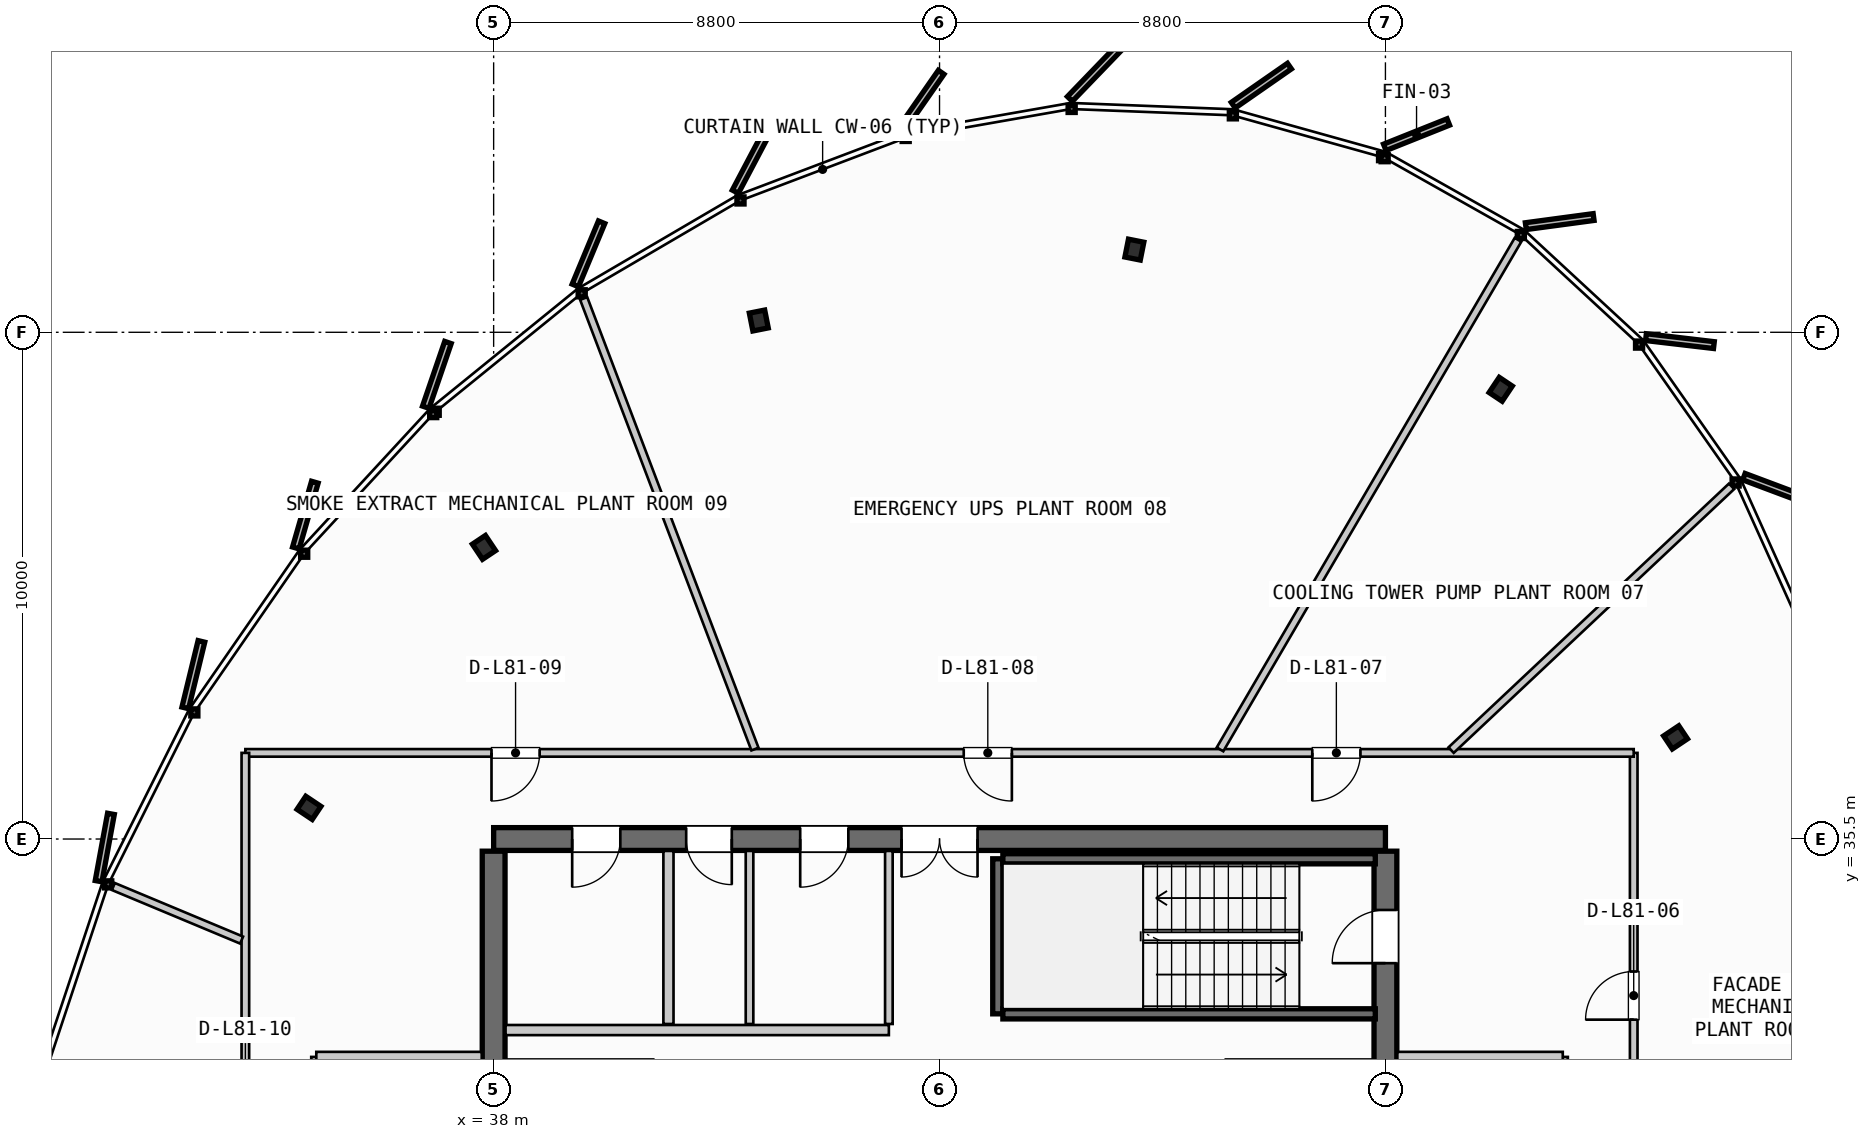
"""IFC4 building model, lengths in metres.
Left out: names, types, materials, properties, quantities, classifications, styles, units other than length and angle.
Written with IfcOpenShell. Run it as: python <this file> out.ifc"""

import sys

from ifc_helpers import new_model, si_unit, direction, frame, frame_2d, origin, origin_2d, place, context, subcontext, project, spatial, rectangle, i_section, extrude, source, transform, mapped, element, fill, save


model = new_model("IFC4")
c1 = context("Model", 3, precision=1e-05, world=origin(), true_north=direction((0.0, 1.0)))
c2 = subcontext(c1, "Body", "Model", "MODEL_VIEW")
j1 = project(units=[si_unit("LENGTHUNIT", "METRE"), si_unit("PLANEANGLEUNIT", "RADIAN")], contexts=[c1])
p1 = place(None, origin())
s1 = spatial("IfcSite", under=j1, at=p1, CompositionType="ELEMENT")
p2 = place(p1, origin())
s2 = spatial("IfcBuilding", under=s1, at=p2, CompositionType="ELEMENT")
p3 = place(p2, frame((0.0, 0.0, 304.3)))
s3 = spatial("IfcBuildingStorey", under=s2, at=p3, CompositionType="ELEMENT", Elevation=304.3)
p4 = place(p3, frame((55.6, 35.5, 0.0), z_axis=(0.0, 0.0, 1.0), x_axis=(-1.0, 0.0, 0.0)))
e1 = element("IfcWall", 1, at=p4, inside=s3, PredefinedType="SHEAR", context=c2, shape_type="SweptSolid", body=[
    extrude(rectangle(XDim=17.6, YDim=0.45, at=frame_2d((8.8, 0.0))), origin(), (0.0, 0.0, 1.0), 3.735),
])
p5 = place(p4, frame((8.05, 0.0, 0.0)))
e2 = element("IfcOpeningElement", 2, at=p5, cuts=e1, PredefinedType="OPENING", context=c2, shape_type="SweptSolid", body=[
    extrude(rectangle(XDim=1.5, YDim=2.2, at=frame_2d((0.75, 1.1))), frame((0.0, 0.235, 0.0), z_axis=(0.0, -1.0, 0.0), x_axis=(1.0, 0.0, 0.0)), (0.0, 0.0, 1.0), 0.47),
])
p6 = place(p4, frame((15.1, 0.0, 0.0)))
e3 = element("IfcOpeningElement", 3, at=p6, cuts=e1, PredefinedType="OPENING", context=c2, shape_type="SweptSolid", body=[
    extrude(rectangle(XDim=0.95, YDim=2.15, at=frame_2d((0.475, 1.075))), frame((0.0, 0.235, 0.0), z_axis=(0.0, -1.0, 0.0), x_axis=(1.0, 0.0, 0.0)), (0.0, 0.0, 1.0), 0.47),
])
p7 = place(p4, frame((12.9, 0.0, 0.0)))
e4 = element("IfcOpeningElement", 4, at=p7, cuts=e1, PredefinedType="OPENING", context=c2, shape_type="SweptSolid", body=[
    extrude(rectangle(XDim=0.9, YDim=2.15, at=frame_2d((0.45, 1.075))), frame((0.0, 0.235, 0.0), z_axis=(0.0, -1.0, 0.0), x_axis=(1.0, 0.0, 0.0)), (0.0, 0.0, 1.0), 0.47),
])
p8 = place(p4, frame((10.6, 0.0, 0.0)))
e5 = element("IfcOpeningElement", 5, at=p8, cuts=e1, PredefinedType="OPENING", context=c2, shape_type="SweptSolid", body=[
    extrude(rectangle(XDim=0.95, YDim=2.15, at=frame_2d((0.475, 1.075))), frame((0.0, 0.235, 0.0), z_axis=(0.0, -1.0, 0.0), x_axis=(1.0, 0.0, 0.0)), (0.0, 0.0, 1.0), 0.47),
])
p9 = place(p3, frame((38.0, 35.26, 0.0), z_axis=(0.0, 0.0, 1.0), x_axis=(0.0, -1.0, 0.0)))
e6 = element("IfcWall", 6, at=p9, inside=s3, PredefinedType="SHEAR", context=c2, shape_type="SweptSolid", body=[
    extrude(rectangle(XDim=14.92, YDim=0.45, at=frame_2d((7.46, 0.0))), origin(), (0.0, 0.0, 1.0), 3.735),
])
p10 = place(p9, frame((5.21, 0.0, 0.0)))
e7 = element("IfcOpeningElement", 7, at=p10, cuts=e6, PredefinedType="OPENING", context=c2, shape_type="SweptSolid", body=[
    extrude(rectangle(XDim=1.1, YDim=2.2, at=frame_2d((0.55, 1.1))), frame((0.0, 0.235, 0.0), z_axis=(0.0, -1.0, 0.0), x_axis=(1.0, 0.0, 0.0)), (0.0, 0.0, 1.0), 0.47),
])
p11 = place(p3, frame((55.6, 20.34, 0.0), z_axis=(0.0, 0.0, 1.0), x_axis=(0.0, 1.0, 0.0)))
e8 = element("IfcWall", 8, at=p11, inside=s3, PredefinedType="SHEAR", context=c2, shape_type="SweptSolid", body=[
    extrude(rectangle(XDim=14.92, YDim=0.45, at=frame_2d((7.46, 0.0))), origin(), (0.0, 0.0, 1.0), 3.735),
])
p12 = place(p11, frame((12.71, 0.0, 0.0)))
e9 = element("IfcOpeningElement", 9, at=p12, cuts=e8, PredefinedType="OPENING", context=c2, shape_type="SweptSolid", body=[
    extrude(rectangle(XDim=1.05, YDim=2.15, at=frame_2d((0.525, 1.075))), frame((0.0, 0.235, 0.0), z_axis=(0.0, -1.0, 0.0), x_axis=(1.0, 0.0, 0.0)), (0.0, 0.0, 1.0), 0.47),
])
p13 = place(p11, frame((8.61, 0.0, 0.0)))
e10 = element("IfcOpeningElement", 10, at=p13, cuts=e8, PredefinedType="OPENING", context=c2, shape_type="SweptSolid", body=[
    extrude(rectangle(XDim=1.1, YDim=2.2, at=frame_2d((0.55, 1.1))), frame((0.0, 0.235, 0.0), z_axis=(0.0, -1.0, 0.0), x_axis=(1.0, 0.0, 0.0)), (0.0, 0.0, 1.0), 0.47),
])
m1 = source(origin(), c2, "Body", "SweptSolid", [
    extrude(i_section(OverallWidth=0.309, OverallDepth=0.359, WebThickness=0.016, FlangeThickness=0.026, FilletRadius=0.027, at=origin_2d()), origin(), (0.0, 0.0, 1.0), 3.735),
])
for number, where, z_axis, x_axis in (
    (11, (61.326, 37.506, 0.0), (0.0, 0.0, 1.0), (0.831, 0.556, 0.0)),
    (12, (57.875, 44.375, 0.0), (0.0, 0.0, 1.0), (0.556, 0.831, 0.0)),
    (13, (50.645, 47.132, 0.0), (0.0, 0.0, 1.0), (0.195, 0.981, 0.0)),
    (14, (43.233, 45.732, 0.0), (0.0, 0.0, 1.0), (-0.195, 0.981, 0.0)),
    (15, (37.81, 41.255, 0.0), (0.0, 0.0, 1.0), (-0.556, 0.831, 0.0)),
    (16, (34.356, 36.115, 0.0), (0.0, 0.0, 1.0), (-0.831, 0.556, 0.0)),
):
    element("IfcColumn", number, at=place(p3, frame(where, z_axis=z_axis, x_axis=x_axis)), inside=s3, PredefinedType="COLUMN", context=c2, shape_type="MappedRepresentation", body=[
        mapped(m1, transform((0.0, 0.0, 0.0), scale=1.0)),
    ])
p14 = place(p3, frame((47.95, 32.05, 0.0), z_axis=(0.0, 0.0, 1.0), x_axis=(0.0, 1.0, 0.0)))
e17 = element("IfcWall", 17, at=p14, inside=s3, PredefinedType="SHEAR", context=c2, shape_type="SweptSolid", body=[
    extrude(rectangle(XDim=3.06, YDim=0.2, at=frame_2d((1.53, 0.0))), origin(), (0.0, 0.0, 1.0), 3.735),
])
for number, where, z_axis, x_axis in (
    (18, (48.05, 35.11, 0.0), (0.0, 0.0, 1.0), (1.0, 0.0, 0.0)),
    (19, (55.4, 32.05, 0.0), (0.0, 0.0, 1.0), (-1.0, 0.0, 0.0)),
):
    element("IfcWall", number, at=place(p3, frame(where, z_axis=z_axis, x_axis=x_axis)), inside=s3, PredefinedType="SHEAR", context=c2, shape_type="SweptSolid", body=[
        extrude(rectangle(XDim=7.35, YDim=0.2, at=frame_2d((3.675, 0.0))), origin(), (0.0, 0.0, 1.0), 3.735),
    ])
p15 = place(p3, frame((38.235, 31.05, 0.0), z_axis=(0.0, 0.0, 1.0), x_axis=(1.0, 0.0, 0.0)))
e20 = element("IfcWall", 20, at=p15, inside=s3, PredefinedType="PARTITIONING", context=c2, shape_type="SweptSolid", body=[
    extrude(rectangle(XDim=2.915, YDim=0.2, at=frame_2d((1.458, 0.0))), origin(), (0.0, 0.0, 1.0), 3.26),
])
p16 = place(p3, frame((34.5, 31.2, 0.0), z_axis=(0.0, 0.0, 1.0), x_axis=(0.0, -1.0, 0.0)))
e21 = element("IfcWall", 21, at=p16, inside=s3, PredefinedType="PARTITIONING", context=c2, shape_type="SweptSolid", body=[
    extrude(rectangle(XDim=4.4, YDim=0.2, at=frame_2d((2.2, 0.0))), origin(), (0.0, 0.0, 1.0), 3.26),
])
p17 = place(p16, frame((1.65, 0.0, 0.0)))
e22 = element("IfcOpeningElement", 22, at=p17, cuts=e21, PredefinedType="OPENING", context=c2, shape_type="SweptSolid", body=[
    extrude(rectangle(XDim=1.05, YDim=2.15, at=frame_2d((0.525, 1.075))), frame((0.0, 0.11, 0.0), z_axis=(0.0, -1.0, 0.0), x_axis=(1.0, 0.0, 0.0)), (0.0, 0.0, 1.0), 0.22),
])
p18 = place(p3, frame((34.5, 31.2, 0.0), z_axis=(0.0, 0.0, 1.0), x_axis=(1.0, 0.0, 0.0)))
e23 = element("IfcWall", 23, at=p18, inside=s3, PredefinedType="PARTITIONING", context=c2, shape_type="SweptSolid", body=[
    extrude(rectangle(XDim=3.265, YDim=0.2, at=frame_2d((1.632, 0.0))), origin(), (0.0, 0.0, 1.0), 3.26),
])
p19 = place(p3, frame((52.45, 31.05, 0.0), z_axis=(0.0, 0.0, 1.0), x_axis=(1.0, 0.0, 0.0)))
e24 = element("IfcWall", 24, at=p19, inside=s3, PredefinedType="PARTITIONING", context=c2, shape_type="SweptSolid", body=[
    extrude(rectangle(XDim=2.915, YDim=0.2, at=frame_2d((1.458, 0.0))), origin(), (0.0, 0.0, 1.0), 3.26),
])
p20 = place(p3, frame((59.1, 26.8, 0.0), z_axis=(0.0, 0.0, 1.0), x_axis=(0.0, 1.0, 0.0)))
e25 = element("IfcWall", 25, at=p20, inside=s3, PredefinedType="PARTITIONING", context=c2, shape_type="SweptSolid", body=[
    extrude(rectangle(XDim=4.4, YDim=0.2, at=frame_2d((2.2, 0.0))), origin(), (0.0, 0.0, 1.0), 3.26),
])
p21 = place(p20, frame((1.65, 0.0, 0.0)))
e26 = element("IfcOpeningElement", 26, at=p21, cuts=e25, PredefinedType="OPENING", context=c2, shape_type="SweptSolid", body=[
    extrude(rectangle(XDim=1.05, YDim=2.15, at=frame_2d((0.525, 1.075))), frame((0.0, 0.11, 0.0), z_axis=(0.0, -1.0, 0.0), x_axis=(1.0, 0.0, 0.0)), (0.0, 0.0, 1.0), 0.22),
])
p22 = place(p3, frame((55.835, 31.2, 0.0), z_axis=(0.0, 0.0, 1.0), x_axis=(1.0, 0.0, 0.0)))
e27 = element("IfcWall", 27, at=p22, inside=s3, PredefinedType="PARTITIONING", context=c2, shape_type="SweptSolid", body=[
    extrude(rectangle(XDim=3.265, YDim=0.2, at=frame_2d((1.633, 0.0))), origin(), (0.0, 0.0, 1.0), 3.26),
])
p23 = place(p3, frame((41.45, 31.85, 0.0), z_axis=(0.0, 0.0, 1.0), x_axis=(0.0, 1.0, 0.0)))
e28 = element("IfcWall", 28, at=p23, inside=s3, PredefinedType="PARTITIONING", context=c2, shape_type="SweptSolid", body=[
    extrude(rectangle(XDim=3.415, YDim=0.2, at=frame_2d((1.708, 0.0))), origin(), (0.0, 0.0, 1.0), 3.26),
])
p24 = place(p3, frame((38.235, 31.73, 0.0), z_axis=(0.0, 0.0, 1.0), x_axis=(1.0, 0.0, 0.0)))
e29 = element("IfcWall", 29, at=p24, inside=s3, PredefinedType="PARTITIONING", context=c2, shape_type="SweptSolid", body=[
    extrude(rectangle(XDim=7.565, YDim=0.2, at=frame_2d((3.782, 0.0))), origin(), (0.0, 0.0, 1.0), 3.26),
])
p25 = place(p3, frame((45.8, 31.85, 0.0), z_axis=(0.0, 0.0, 1.0), x_axis=(0.0, 1.0, 0.0)))
e30 = element("IfcWall", 30, at=p25, inside=s3, PredefinedType="PARTITIONING", context=c2, shape_type="SweptSolid", body=[
    extrude(rectangle(XDim=3.415, YDim=0.15, at=frame_2d((1.708, 0.0))), origin(), (0.0, 0.0, 1.0), 3.26),
])
p26 = place(p3, frame((43.05, 31.85, 0.0), z_axis=(0.0, 0.0, 1.0), x_axis=(0.0, 1.0, 0.0)))
e31 = element("IfcWall", 31, at=p26, inside=s3, PredefinedType="PLUMBINGWALL", context=c2, shape_type="SweptSolid", body=[
    extrude(rectangle(XDim=3.415, YDim=0.15, at=frame_2d((1.708, 0.0))), origin(), (0.0, 0.0, 1.0), 3.26),
])
p27 = place(p3, frame((60.5, 18.4, 0.0), z_axis=(0.0, 0.0, 1.0), x_axis=(0.0, 1.0, 0.0)))
e32 = element("IfcWall", 32, at=p27, inside=s3, PredefinedType="PARTITIONING", context=c2, shape_type="SweptSolid", body=[
    extrude(rectangle(XDim=18.8, YDim=0.15, at=frame_2d((9.4, 0.0))), origin(), (0.0, 0.0, 1.0), 3.26),
])
p28 = place(p27, frame((8.276, 0.0, 0.0)))
e33 = element("IfcOpeningElement", 33, at=p28, cuts=e32, PredefinedType="OPENING", context=c2, shape_type="SweptSolid", body=[
    extrude(rectangle(XDim=0.95, YDim=2.15, at=frame_2d((0.475, 1.075))), frame((0.0, 0.085, 0.0), z_axis=(0.0, -1.0, 0.0), x_axis=(1.0, 0.0, 0.0)), (0.0, 0.0, 1.0), 0.17),
])
p29 = place(p27, frame((13.535, 0.0, 0.0)))
e34 = element("IfcOpeningElement", 34, at=p29, cuts=e32, PredefinedType="OPENING", context=c2, shape_type="SweptSolid", body=[
    extrude(rectangle(XDim=0.95, YDim=2.15, at=frame_2d((0.475, 1.075))), frame((0.0, 0.085, 0.0), z_axis=(0.0, -1.0, 0.0), x_axis=(1.0, 0.0, 0.0)), (0.0, 0.0, 1.0), 0.17),
])
p30 = place(p3, frame((60.5, 37.2, 0.0), z_axis=(0.0, 0.0, 1.0), x_axis=(-1.0, 0.0, 0.0)))
e35 = element("IfcWall", 35, at=p30, inside=s3, PredefinedType="PARTITIONING", context=c2, shape_type="SweptSolid", body=[
    extrude(rectangle(XDim=27.4, YDim=0.15, at=frame_2d((13.7, 0.0))), origin(), (0.0, 0.0, 1.0), 3.26),
])
p31 = place(p30, frame((5.393, 0.0, 0.0)))
e36 = element("IfcOpeningElement", 36, at=p31, cuts=e35, PredefinedType="OPENING", context=c2, shape_type="SweptSolid", body=[
    extrude(rectangle(XDim=0.95, YDim=2.15, at=frame_2d((0.475, 1.075))), frame((0.0, 0.085, 0.0), z_axis=(0.0, -1.0, 0.0), x_axis=(1.0, 0.0, 0.0)), (0.0, 0.0, 1.0), 0.17),
])
p32 = place(p30, frame((12.272, 0.0, 0.0)))
e37 = element("IfcOpeningElement", 37, at=p32, cuts=e35, PredefinedType="OPENING", context=c2, shape_type="SweptSolid", body=[
    extrude(rectangle(XDim=0.95, YDim=2.15, at=frame_2d((0.475, 1.075))), frame((0.0, 0.085, 0.0), z_axis=(0.0, -1.0, 0.0), x_axis=(1.0, 0.0, 0.0)), (0.0, 0.0, 1.0), 0.17),
])
p33 = place(p30, frame((21.592, 0.0, 0.0)))
e38 = element("IfcOpeningElement", 38, at=p33, cuts=e35, PredefinedType="OPENING", context=c2, shape_type="SweptSolid", body=[
    extrude(rectangle(XDim=0.95, YDim=2.15, at=frame_2d((0.475, 1.075))), frame((0.0, 0.085, 0.0), z_axis=(0.0, -1.0, 0.0), x_axis=(1.0, 0.0, 0.0)), (0.0, 0.0, 1.0), 0.17),
])
p34 = place(p3, frame((33.1, 37.2, 0.0), z_axis=(0.0, 0.0, 1.0), x_axis=(0.0, -1.0, 0.0)))
e39 = element("IfcWall", 39, at=p34, inside=s3, PredefinedType="PARTITIONING", context=c2, shape_type="SweptSolid", body=[
    extrude(rectangle(XDim=18.8, YDim=0.15, at=frame_2d((9.4, 0.0))), origin(), (0.0, 0.0, 1.0), 3.26),
])
p35 = place(p34, frame((13.507, 0.0, 0.0)))
e40 = element("IfcOpeningElement", 40, at=p35, cuts=e39, PredefinedType="OPENING", context=c2, shape_type="SweptSolid", body=[
    extrude(rectangle(XDim=0.95, YDim=2.15, at=frame_2d((0.475, 1.075))), frame((0.0, 0.085, 0.0), z_axis=(0.0, -1.0, 0.0), x_axis=(1.0, 0.0, 0.0)), (0.0, 0.0, 1.0), 0.17),
])
p36 = place(p34, frame((7.848, 0.0, 0.0)))
e41 = element("IfcOpeningElement", 41, at=p36, cuts=e39, PredefinedType="OPENING", context=c2, shape_type="SweptSolid", body=[
    extrude(rectangle(XDim=0.95, YDim=2.15, at=frame_2d((0.475, 1.075))), frame((0.0, 0.085, 0.0), z_axis=(0.0, -1.0, 0.0), x_axis=(1.0, 0.0, 0.0)), (0.0, 0.0, 1.0), 0.17),
])
p37 = place(p3, frame((56.896, 37.255, 0.0), z_axis=(0.0, 0.0, 1.0), x_axis=(0.728447090506, 0.685102062713, 0.0)))
e42 = element("IfcWall", 42, at=p37, inside=s3, PredefinedType="PARTITIONING", context=c2, shape_type="SweptSolid", body=[
    extrude(rectangle(XDim=7.598, YDim=0.15, at=frame_2d((3.799, 0.0))), origin(), (0.0, 0.0, 1.0), 3.26),
])
p38 = place(p3, frame((52.336, 37.269, 0.0), z_axis=(0.0, 0.0, 1.0), x_axis=(0.504823212325, 0.863222754738, 0.0)))
e43 = element("IfcWall", 43, at=p38, inside=s3, PredefinedType="PARTITIONING", context=c2, shape_type="SweptSolid", body=[
    extrude(rectangle(XDim=11.65, YDim=0.15, at=frame_2d((5.825, 0.0))), origin(), (0.0, 0.0, 1.0), 3.26),
])
p39 = place(p3, frame((43.157, 37.275, 0.0), z_axis=(0.0, 0.0, 1.0), x_axis=(-0.355321814882, 0.934744033342, 0.0)))
e44 = element("IfcWall", 44, at=p39, inside=s3, PredefinedType="PARTITIONING", context=c2, shape_type="SweptSolid", body=[
    extrude(rectangle(XDim=9.513, YDim=0.15, at=frame_2d((4.756, 0.0))), origin(), (0.0, 0.0, 1.0), 3.26),
])
p40 = place(p3, frame((33.026, 33.506, 0.0), z_axis=(0.0, 0.0, 1.0), x_axis=(-0.922747412887, 0.385405256854, 0.0)))
e45 = element("IfcWall", 45, at=p40, inside=s3, PredefinedType="PARTITIONING", context=c2, shape_type="SweptSolid", body=[
    extrude(rectangle(XDim=2.743, YDim=0.15, at=frame_2d((1.372, 0.0))), origin(), (0.0, 0.0, 1.0), 3.26),
])
m2 = source(origin(), c2, "Body", "SweptSolid", [
    extrude(rectangle(XDim=1.05, YDim=2.15, at=frame_2d((0.525, 1.075))), frame((0.0, 0.025, 0.0), z_axis=(0.0, -1.0, 0.0), x_axis=(1.0, 0.0, 0.0)), (0.0, 0.0, 1.0), 0.05),
])
p41 = place(p12, origin())
e46 = element("IfcDoor", 46, at=p41, inside=s3, OperationType="SINGLE_SWING_LEFT", PredefinedType="DOOR", context=c2, shape_type="MappedRepresentation", body=[
    mapped(m2, transform((0.0, 0.0, 0.0), scale=1.0)),
])
fill(e9, e46)
m3 = source(origin(), c2, "Body", "SweptSolid", [
    extrude(rectangle(XDim=1.5, YDim=2.2, at=frame_2d((0.75, 1.1))), frame((0.0, 0.025, 0.0), z_axis=(0.0, -1.0, 0.0), x_axis=(1.0, 0.0, 0.0)), (0.0, 0.0, 1.0), 0.05),
])
p42 = place(p5, origin())
e47 = element("IfcDoor", 47, at=p42, inside=s3, OperationType="DOUBLE_DOOR_SINGLE_SWING", PredefinedType="DOOR", context=c2, shape_type="MappedRepresentation", body=[
    mapped(m3, transform((0.0, 0.0, 0.0), scale=1.0)),
])
fill(e2, e47)
m4 = source(origin(), c2, "Body", "SweptSolid", [
    extrude(rectangle(XDim=0.95, YDim=2.15, at=frame_2d((0.475, 1.075))), frame((0.0, 0.025, 0.0), z_axis=(0.0, -1.0, 0.0), x_axis=(1.0, 0.0, 0.0)), (0.0, 0.0, 1.0), 0.05),
])
p43 = place(p6, origin())
e48 = element("IfcDoor", 48, at=p43, inside=s3, OperationType="SINGLE_SWING_RIGHT", PredefinedType="DOOR", context=c2, shape_type="MappedRepresentation", body=[
    mapped(m4, transform((0.0, 0.0, 0.0), scale=1.0)),
])
fill(e3, e48)
m5 = source(origin(), c2, "Body", "SweptSolid", [
    extrude(rectangle(XDim=0.9, YDim=2.15, at=frame_2d((0.45, 1.075))), frame((0.0, 0.025, 0.0), z_axis=(0.0, -1.0, 0.0), x_axis=(1.0, 0.0, 0.0)), (0.0, 0.0, 1.0), 0.05),
])
p44 = place(p7, origin())
e49 = element("IfcDoor", 49, at=p44, inside=s3, OperationType="SINGLE_SWING_LEFT", PredefinedType="DOOR", context=c2, shape_type="MappedRepresentation", body=[
    mapped(m5, transform((0.0, 0.0, 0.0), scale=1.0)),
])
fill(e4, e49)
p45 = place(p8, origin())
e50 = element("IfcDoor", 50, at=p45, inside=s3, OperationType="SINGLE_SWING_RIGHT", PredefinedType="DOOR", context=c2, shape_type="MappedRepresentation", body=[
    mapped(m4, transform((0.0, 0.0, 0.0), scale=1.0)),
])
fill(e5, e50)
p46 = place(p29, origin())
e51 = element("IfcDoor", 51, at=p46, inside=s3, OperationType="SINGLE_SWING_LEFT", PredefinedType="DOOR", context=c2, shape_type="MappedRepresentation", body=[
    mapped(m4, transform((0.0, 0.0, 0.0), scale=1.0)),
])
fill(e34, e51)
p47 = place(p31, origin())
e52 = element("IfcDoor", 52, at=p47, inside=s3, OperationType="SINGLE_SWING_RIGHT", PredefinedType="DOOR", context=c2, shape_type="MappedRepresentation", body=[
    mapped(m4, transform((0.0, 0.0, 0.0), scale=1.0)),
])
fill(e36, e52)
p48 = place(p32, origin())
e53 = element("IfcDoor", 53, at=p48, inside=s3, OperationType="SINGLE_SWING_LEFT", PredefinedType="DOOR", context=c2, shape_type="MappedRepresentation", body=[
    mapped(m4, transform((0.0, 0.0, 0.0), scale=1.0)),
])
fill(e37, e53)
p49 = place(p33, origin())
e54 = element("IfcDoor", 54, at=p49, inside=s3, OperationType="SINGLE_SWING_RIGHT", PredefinedType="DOOR", context=c2, shape_type="MappedRepresentation", body=[
    mapped(m4, transform((0.0, 0.0, 0.0), scale=1.0)),
])
fill(e38, e54)
save(model, sys.argv[1])
